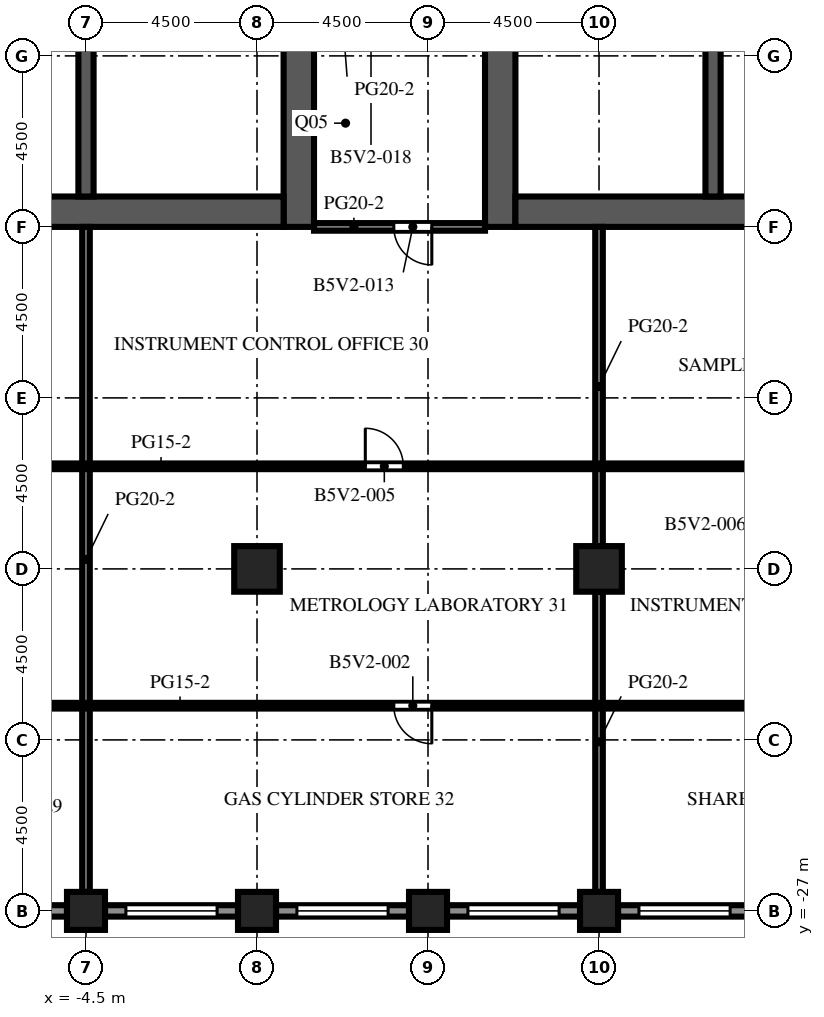
"""IFC4 building model, lengths in metres.
Left out: names, types, materials, properties, quantities, classifications, styles, units other than length and angle.
Written with IfcOpenShell. Run it as: python <this file> out.ifc"""

import sys

from ifc_helpers import new_model, si_unit, direction, frame, frame_2d, origin, origin_2d, place, context, subcontext, project, spatial, rectangle, extrude, element, fill, save


model = new_model("IFC4")
c1 = context("Model", 3, precision=1e-05, world=origin(), true_north=direction((0.0, 1.0)))
c2 = subcontext(c1, "Body", "Model", "MODEL_VIEW")
j1 = project(units=[si_unit("LENGTHUNIT", "METRE"), si_unit("PLANEANGLEUNIT", "RADIAN")], contexts=[c1])
p1 = place(None, origin())
s1 = spatial("IfcSite", under=j1, at=p1, CompositionType="ELEMENT")
p2 = place(p1, origin())
s2 = spatial("IfcBuilding", under=s1, at=p2, CompositionType="ELEMENT")
p3 = place(p2, frame((0.0, 0.0, 181.4)))
s3 = spatial("IfcBuildingStorey", under=s2, at=p3, CompositionType="ELEMENT", Elevation=181.4)
for number, where, z_axis, x_axis in (
    (1, (-4.5, -27.0, 0.0), (0.0, 0.0, 1.0), (1.0, 0.0, 0.0)),
    (2, (0.0, -27.0, 0.0), (0.0, 0.0, 1.0), (1.0, 0.0, 0.0)),
    (3, (4.5, -27.0, 0.0), (0.0, 0.0, 1.0), (1.0, 0.0, 0.0)),
    (4, (9.0, -27.0, 0.0), (0.0, 0.0, 1.0), (1.0, 0.0, 0.0)),
):
    element("IfcColumn", number, at=place(p3, frame(where, z_axis=z_axis, x_axis=x_axis)), inside=s3, PredefinedType="COLUMN", context=c2, shape_type="SweptSolid", body=[
        extrude(rectangle(XDim=1.0, YDim=1.0, at=origin_2d()), origin(), (0.0, 0.0, 1.0), 4.1),
    ])
for number, where, z_axis, x_axis in (
    (5, (0.0, -18.0, 0.0), (0.0, 0.0, 1.0), (1.0, 0.0, 0.0)),
    (6, (9.0, -18.0, 0.0), (0.0, 0.0, 1.0), (1.0, 0.0, 0.0)),
):
    element("IfcColumn", number, at=place(p3, frame(where, z_axis=z_axis, x_axis=x_axis)), inside=s3, PredefinedType="COLUMN", context=c2, shape_type="SweptSolid", body=[
        extrude(rectangle(XDim=1.2, YDim=1.2, at=origin_2d()), origin(), (0.0, 0.0, 1.0), 4.1),
    ])
p4 = place(p3, frame((1.1, -9.0, 0.0), z_axis=(0.0, 0.0, 1.0), x_axis=(0.0, 1.0, 0.0)))
e7 = element("IfcWall", 7, at=p4, inside=s3, PredefinedType="SHEAR", context=c2, shape_type="SweptSolid", body=[
    extrude(rectangle(XDim=27.5, YDim=0.8, at=frame_2d((13.75, 0.0))), origin(), (0.0, 0.0, 1.0), 4.1),
])
p5 = place(p4, frame((12.55, 0.0, 0.0)))
e8 = element("IfcOpeningElement", 8, at=p5, cuts=e7, PredefinedType="OPENING", context=c2, shape_type="SweptSolid", body=[
    extrude(rectangle(XDim=2.4, YDim=2.4, at=frame_2d((1.2, 1.2))), frame((0.0, 0.41, 0.0), z_axis=(0.0, -1.0, 0.0), x_axis=(1.0, 0.0, 0.0)), (0.0, 0.0, 1.0), 0.82),
])
p6 = place(p4, frame((3.85, 0.0, 0.0)))
e9 = element("IfcOpeningElement", 9, at=p6, cuts=e7, PredefinedType="OPENING", context=c2, shape_type="SweptSolid", body=[
    extrude(rectangle(XDim=0.95, YDim=2.1, at=frame_2d((0.475, 1.05))), frame((0.0, 0.41, 0.0), z_axis=(0.0, -1.0, 0.0), x_axis=(1.0, 0.0, 0.0)), (0.0, 0.0, 1.0), 0.82),
])
p7 = place(p4, frame((23.475, 0.0, 0.0)))
e10 = element("IfcOpeningElement", 10, at=p7, cuts=e7, PredefinedType="OPENING", context=c2, shape_type="SweptSolid", body=[
    extrude(rectangle(XDim=1.2, YDim=2.1, at=frame_2d((0.6, 1.05))), frame((0.0, 0.41, 0.0), z_axis=(0.0, -1.0, 0.0), x_axis=(1.0, 0.0, 0.0)), (0.0, 0.0, 1.0), 0.82),
])
p8 = place(p3, frame((-9.7, -8.6, 0.0), z_axis=(0.0, 0.0, 1.0), x_axis=(1.0, 0.0, 0.0)))
e11 = element("IfcWall", 11, at=p8, inside=s3, PredefinedType="SHEAR", context=c2, shape_type="SweptSolid", body=[
    extrude(rectangle(XDim=10.4, YDim=0.8, at=frame_2d((5.2, 0.0))), origin(), (0.0, 0.0, 1.0), 4.1),
])
p9 = place(p3, frame((-4.5, -8.2, 0.0), z_axis=(0.0, 0.0, 1.0), x_axis=(0.0, 1.0, 0.0)))
e12 = element("IfcWall", 12, at=p9, inside=s3, PredefinedType="SHEAR", context=c2, shape_type="SweptSolid", body=[
    extrude(rectangle(XDim=7.5, YDim=0.4, at=frame_2d((3.75, 0.0))), origin(), (0.0, 0.0, 1.0), 4.1),
])
p10 = place(p3, frame((6.4, -9.0, 0.0), z_axis=(0.0, 0.0, 1.0), x_axis=(0.0, 1.0, 0.0)))
e13 = element("IfcWall", 13, at=p10, inside=s3, PredefinedType="SHEAR", context=c2, shape_type="SweptSolid", body=[
    extrude(rectangle(XDim=27.5, YDim=0.8, at=frame_2d((13.75, 0.0))), origin(), (0.0, 0.0, 1.0), 4.1),
])
p11 = place(p10, frame((12.55, 0.0, 0.0)))
e14 = element("IfcOpeningElement", 14, at=p11, cuts=e13, PredefinedType="OPENING", context=c2, shape_type="SweptSolid", body=[
    extrude(rectangle(XDim=2.4, YDim=2.4, at=frame_2d((1.2, 1.2))), frame((0.0, 0.41, 0.0), z_axis=(0.0, -1.0, 0.0), x_axis=(1.0, 0.0, 0.0)), (0.0, 0.0, 1.0), 0.82),
])
p12 = place(p10, frame((3.85, 0.0, 0.0)))
e15 = element("IfcOpeningElement", 15, at=p12, cuts=e13, PredefinedType="OPENING", context=c2, shape_type="SweptSolid", body=[
    extrude(rectangle(XDim=0.95, YDim=2.1, at=frame_2d((0.475, 1.05))), frame((0.0, 0.41, 0.0), z_axis=(0.0, -1.0, 0.0), x_axis=(1.0, 0.0, 0.0)), (0.0, 0.0, 1.0), 0.82),
])
p13 = place(p10, frame((23.475, 0.0, 0.0)))
e16 = element("IfcOpeningElement", 16, at=p13, cuts=e13, PredefinedType="OPENING", context=c2, shape_type="SweptSolid", body=[
    extrude(rectangle(XDim=1.2, YDim=2.1, at=frame_2d((0.6, 1.05))), frame((0.0, 0.41, 0.0), z_axis=(0.0, -1.0, 0.0), x_axis=(1.0, 0.0, 0.0)), (0.0, 0.0, 1.0), 0.82),
])
p14 = place(p3, frame((6.8, -8.6, 0.0), z_axis=(0.0, 0.0, 1.0), x_axis=(1.0, 0.0, 0.0)))
e17 = element("IfcWall", 17, at=p14, inside=s3, PredefinedType="SHEAR", context=c2, shape_type="SweptSolid", body=[
    extrude(rectangle(XDim=10.4, YDim=0.8, at=frame_2d((5.2, 0.0))), origin(), (0.0, 0.0, 1.0), 4.1),
])
p15 = place(p3, frame((12.0, -8.2, 0.0), z_axis=(0.0, 0.0, 1.0), x_axis=(0.0, 1.0, 0.0)))
e18 = element("IfcWall", 18, at=p15, inside=s3, PredefinedType="SHEAR", context=c2, shape_type="SweptSolid", body=[
    extrude(rectangle(XDim=7.5, YDim=0.4, at=frame_2d((3.75, 0.0))), origin(), (0.0, 0.0, 1.0), 4.1),
])
p16 = place(p3, frame((-5.0, -27.0, 0.0), z_axis=(0.0, 0.0, 1.0), x_axis=(-1.0, 0.0, 0.0)))
e19 = element("IfcWall", 19, at=p16, inside=s3, PredefinedType="SOLIDWALL", context=c2, shape_type="SweptSolid", body=[
    extrude(rectangle(XDim=3.5, YDim=0.3, at=frame_2d((1.75, 0.0))), origin(), (0.0, 0.0, 1.0), 2.7),
])
p17 = place(p16, frame((0.55, 0.0, 0.8)))
e20 = element("IfcOpeningElement", 20, at=p17, cuts=e19, PredefinedType="OPENING", context=c2, shape_type="SweptSolid", body=[
    extrude(rectangle(XDim=2.4, YDim=1.7, at=frame_2d((1.2, 0.85))), frame((0.0, 0.16, 0.0), z_axis=(0.0, -1.0, 0.0), x_axis=(1.0, 0.0, 0.0)), (0.0, 0.0, 1.0), 0.32),
])
p18 = place(p3, frame((-0.5, -27.0, 0.0), z_axis=(0.0, 0.0, 1.0), x_axis=(-1.0, 0.0, 0.0)))
e21 = element("IfcWall", 21, at=p18, inside=s3, PredefinedType="SOLIDWALL", context=c2, shape_type="SweptSolid", body=[
    extrude(rectangle(XDim=3.5, YDim=0.3, at=frame_2d((1.75, 0.0))), origin(), (0.0, 0.0, 1.0), 2.7),
])
p19 = place(p18, frame((0.55, 0.0, 0.8)))
e22 = element("IfcOpeningElement", 22, at=p19, cuts=e21, PredefinedType="OPENING", context=c2, shape_type="SweptSolid", body=[
    extrude(rectangle(XDim=2.4, YDim=1.7, at=frame_2d((1.2, 0.85))), frame((0.0, 0.16, 0.0), z_axis=(0.0, -1.0, 0.0), x_axis=(1.0, 0.0, 0.0)), (0.0, 0.0, 1.0), 0.32),
])
p20 = place(p3, frame((4.0, -27.0, 0.0), z_axis=(0.0, 0.0, 1.0), x_axis=(-1.0, 0.0, 0.0)))
e23 = element("IfcWall", 23, at=p20, inside=s3, PredefinedType="SOLIDWALL", context=c2, shape_type="SweptSolid", body=[
    extrude(rectangle(XDim=3.5, YDim=0.3, at=frame_2d((1.75, 0.0))), origin(), (0.0, 0.0, 1.0), 2.7),
])
p21 = place(p20, frame((0.55, 0.0, 0.8)))
e24 = element("IfcOpeningElement", 24, at=p21, cuts=e23, PredefinedType="OPENING", context=c2, shape_type="SweptSolid", body=[
    extrude(rectangle(XDim=2.4, YDim=1.7, at=frame_2d((1.2, 0.85))), frame((0.0, 0.16, 0.0), z_axis=(0.0, -1.0, 0.0), x_axis=(1.0, 0.0, 0.0)), (0.0, 0.0, 1.0), 0.32),
])
p22 = place(p3, frame((8.5, -27.0, 0.0), z_axis=(0.0, 0.0, 1.0), x_axis=(-1.0, 0.0, 0.0)))
e25 = element("IfcWall", 25, at=p22, inside=s3, PredefinedType="SOLIDWALL", context=c2, shape_type="SweptSolid", body=[
    extrude(rectangle(XDim=3.5, YDim=0.3, at=frame_2d((1.75, 0.0))), origin(), (0.0, 0.0, 1.0), 2.7),
])
p23 = place(p22, frame((0.55, 0.0, 0.8)))
e26 = element("IfcOpeningElement", 26, at=p23, cuts=e25, PredefinedType="OPENING", context=c2, shape_type="SweptSolid", body=[
    extrude(rectangle(XDim=2.4, YDim=1.7, at=frame_2d((1.2, 0.85))), frame((0.0, 0.16, 0.0), z_axis=(0.0, -1.0, 0.0), x_axis=(1.0, 0.0, 0.0)), (0.0, 0.0, 1.0), 0.32),
])
p24 = place(p3, frame((13.0, -27.0, 0.0), z_axis=(0.0, 0.0, 1.0), x_axis=(-1.0, 0.0, 0.0)))
e27 = element("IfcWall", 27, at=p24, inside=s3, PredefinedType="SOLIDWALL", context=c2, shape_type="SweptSolid", body=[
    extrude(rectangle(XDim=3.5, YDim=0.3, at=frame_2d((1.75, 0.0))), origin(), (0.0, 0.0, 1.0), 2.7),
])
p25 = place(p24, frame((0.55, 0.0, 0.8)))
e28 = element("IfcOpeningElement", 28, at=p25, cuts=e27, PredefinedType="OPENING", context=c2, shape_type="SweptSolid", body=[
    extrude(rectangle(XDim=2.4, YDim=1.7, at=frame_2d((1.2, 0.85))), frame((0.0, 0.16, 0.0), z_axis=(0.0, -1.0, 0.0), x_axis=(1.0, 0.0, 0.0)), (0.0, 0.0, 1.0), 0.32),
])
p26 = place(p3, frame((-4.3, -5.35, 0.0), z_axis=(0.0, 0.0, 1.0), x_axis=(1.0, 0.0, 0.0)))
e29 = element("IfcWall", 29, at=p26, inside=s3, PredefinedType="PARTITIONING", context=c2, shape_type="SweptSolid", body=[
    extrude(rectangle(XDim=5.0, YDim=0.1, at=frame_2d((2.5, 0.0))), origin(), (0.0, 0.0, 1.0), 3.5),
])
p27 = place(p26, frame((2.0, 0.0, 0.0)))
e30 = element("IfcOpeningElement", 30, at=p27, cuts=e29, PredefinedType="OPENING", context=c2, shape_type="SweptSolid", body=[
    extrude(rectangle(XDim=1.0, YDim=2.1, at=frame_2d((0.5, 1.05))), frame((0.0, 0.06, 0.0), z_axis=(0.0, -1.0, 0.0), x_axis=(1.0, 0.0, 0.0)), (0.0, 0.0, 1.0), 0.12),
])
p28 = place(p3, frame((6.8, -5.35, 0.0), z_axis=(0.0, 0.0, 1.0), x_axis=(1.0, 0.0, 0.0)))
e31 = element("IfcWall", 31, at=p28, inside=s3, PredefinedType="PARTITIONING", context=c2, shape_type="SweptSolid", body=[
    extrude(rectangle(XDim=5.0, YDim=0.1, at=frame_2d((2.5, 0.0))), origin(), (0.0, 0.0, 1.0), 3.5),
])
p29 = place(p28, frame((2.0, 0.0, 0.0)))
e32 = element("IfcOpeningElement", 32, at=p29, cuts=e31, PredefinedType="OPENING", context=c2, shape_type="SweptSolid", body=[
    extrude(rectangle(XDim=1.0, YDim=2.1, at=frame_2d((0.5, 1.05))), frame((0.0, 0.06, 0.0), z_axis=(0.0, -1.0, 0.0), x_axis=(1.0, 0.0, 0.0)), (0.0, 0.0, 1.0), 0.12),
])
p30 = place(p3, frame((-4.5, -26.5, 0.0), z_axis=(0.0, 0.0, 1.0), x_axis=(0.0, 1.0, 0.0)))
e33 = element("IfcWall", 33, at=p30, inside=s3, PredefinedType="PARTITIONING", context=c2, shape_type="SweptSolid", body=[
    extrude(rectangle(XDim=17.5, YDim=0.2, at=frame_2d((8.75, 0.0))), origin(), (0.0, 0.0, 1.0), 3.5),
])
p31 = place(p3, frame((9.0, -26.5, 0.0), z_axis=(0.0, 0.0, 1.0), x_axis=(0.0, 1.0, 0.0)))
e34 = element("IfcWall", 34, at=p31, inside=s3, PredefinedType="PARTITIONING", context=c2, shape_type="SweptSolid", body=[
    extrude(rectangle(XDim=7.9, YDim=0.2, at=frame_2d((3.95, 0.0))), origin(), (0.0, 0.0, 1.0), 3.5),
])
p32 = place(p3, frame((9.0, -17.4, 0.0), z_axis=(0.0, 0.0, 1.0), x_axis=(0.0, 1.0, 0.0)))
e35 = element("IfcWall", 35, at=p32, inside=s3, PredefinedType="PARTITIONING", context=c2, shape_type="SweptSolid", body=[
    extrude(rectangle(XDim=8.4, YDim=0.2, at=frame_2d((4.2, 0.0))), origin(), (0.0, 0.0, 1.0), 3.5),
])
p33 = place(p3, frame((21.0, -21.6, 0.0), z_axis=(0.0, 0.0, 1.0), x_axis=(-1.0, 0.0, 0.0)))
e36 = element("IfcWall", 36, at=p33, inside=s3, PredefinedType="PARTITIONING", context=c2, shape_type="SweptSolid", body=[
    extrude(rectangle(XDim=34.5, YDim=0.15, at=frame_2d((17.25, 0.0))), origin(), (0.0, 0.0, 1.0), 3.5),
])
p34 = place(p33, frame((28.65, 0.0, 0.0)))
e37 = element("IfcOpeningElement", 37, at=p34, cuts=e36, PredefinedType="OPENING", context=c2, shape_type="SweptSolid", body=[
    extrude(rectangle(XDim=1.0, YDim=2.1, at=frame_2d((0.5, 1.05))), frame((0.0, 0.085, 0.0), z_axis=(0.0, -1.0, 0.0), x_axis=(1.0, 0.0, 0.0)), (0.0, 0.0, 1.0), 0.17),
])
p35 = place(p33, frame((16.4, 0.0, 0.0)))
e38 = element("IfcOpeningElement", 38, at=p35, cuts=e36, PredefinedType="OPENING", context=c2, shape_type="SweptSolid", body=[
    extrude(rectangle(XDim=1.0, YDim=2.1, at=frame_2d((0.5, 1.05))), frame((0.0, 0.085, 0.0), z_axis=(0.0, -1.0, 0.0), x_axis=(1.0, 0.0, 0.0)), (0.0, 0.0, 1.0), 0.17),
])
p36 = place(p33, frame((5.15, 0.0, 0.0)))
e39 = element("IfcOpeningElement", 39, at=p36, cuts=e36, PredefinedType="OPENING", context=c2, shape_type="SweptSolid", body=[
    extrude(rectangle(XDim=1.0, YDim=2.1, at=frame_2d((0.5, 1.05))), frame((0.0, 0.085, 0.0), z_axis=(0.0, -1.0, 0.0), x_axis=(1.0, 0.0, 0.0)), (0.0, 0.0, 1.0), 0.17),
])
p37 = place(p3, frame((21.0, -15.3, 0.0), z_axis=(0.0, 0.0, 1.0), x_axis=(-1.0, 0.0, 0.0)))
e40 = element("IfcWall", 40, at=p37, inside=s3, PredefinedType="PARTITIONING", context=c2, shape_type="SweptSolid", body=[
    extrude(rectangle(XDim=34.5, YDim=0.15, at=frame_2d((17.25, 0.0))), origin(), (0.0, 0.0, 1.0), 3.5),
])
p38 = place(p37, frame((28.9, 0.0, 0.0)))
e41 = element("IfcOpeningElement", 41, at=p38, cuts=e40, PredefinedType="OPENING", context=c2, shape_type="SweptSolid", body=[
    extrude(rectangle(XDim=1.0, YDim=2.1, at=frame_2d((0.5, 1.05))), frame((0.0, 0.085, 0.0), z_axis=(0.0, -1.0, 0.0), x_axis=(1.0, 0.0, 0.0)), (0.0, 0.0, 1.0), 0.17),
])
p39 = place(p37, frame((17.15, 0.0, 0.0)))
e42 = element("IfcOpeningElement", 42, at=p39, cuts=e40, PredefinedType="OPENING", context=c2, shape_type="SweptSolid", body=[
    extrude(rectangle(XDim=1.0, YDim=2.1, at=frame_2d((0.5, 1.05))), frame((0.0, 0.085, 0.0), z_axis=(0.0, -1.0, 0.0), x_axis=(1.0, 0.0, 0.0)), (0.0, 0.0, 1.0), 0.17),
])
p40 = place(p37, frame((7.15, 0.0, 0.0)))
e43 = element("IfcOpeningElement", 43, at=p40, cuts=e40, PredefinedType="OPENING", context=c2, shape_type="SweptSolid", body=[
    extrude(rectangle(XDim=1.0, YDim=2.1, at=frame_2d((0.5, 1.05))), frame((0.0, 0.085, 0.0), z_axis=(0.0, -1.0, 0.0), x_axis=(1.0, 0.0, 0.0)), (0.0, 0.0, 1.0), 0.17),
])
p41 = place(p3, frame((6.0, -9.0, 0.0), z_axis=(0.0, 0.0, 1.0), x_axis=(-1.0, 0.0, 0.0)))
e44 = element("IfcWall", 44, at=p41, inside=s3, PredefinedType="PARTITIONING", context=c2, shape_type="SweptSolid", body=[
    extrude(rectangle(XDim=4.5, YDim=0.2, at=frame_2d((2.25, 0.0))), origin(), (0.0, 0.0, 1.0), 3.5),
])
p42 = place(p41, frame((1.4, 0.0, 0.0)))
e45 = element("IfcOpeningElement", 45, at=p42, cuts=e44, PredefinedType="OPENING", context=c2, shape_type="SweptSolid", body=[
    extrude(rectangle(XDim=1.0, YDim=2.1, at=frame_2d((0.5, 1.05))), frame((0.0, 0.11, 0.0), z_axis=(0.0, -1.0, 0.0), x_axis=(1.0, 0.0, 0.0)), (0.0, 0.0, 1.0), 0.22),
])
p43 = place(p19, origin())
e46 = element("IfcWindow", 46, at=p43, inside=s3, PartitioningType="SINGLE_PANEL", PredefinedType="WINDOW", context=c2, shape_type="SweptSolid", body=[
    extrude(rectangle(XDim=2.4, YDim=1.7, at=frame_2d((1.2, 0.85))), frame((0.0, 0.03, 0.0), z_axis=(0.0, -1.0, 0.0), x_axis=(1.0, 0.0, 0.0)), (0.0, 0.0, 1.0), 0.06),
])
fill(e22, e46)
p44 = place(p21, origin())
e47 = element("IfcWindow", 47, at=p44, inside=s3, PartitioningType="SINGLE_PANEL", PredefinedType="WINDOW", context=c2, shape_type="SweptSolid", body=[
    extrude(rectangle(XDim=2.4, YDim=1.7, at=frame_2d((1.2, 0.85))), frame((0.0, 0.03, 0.0), z_axis=(0.0, -1.0, 0.0), x_axis=(1.0, 0.0, 0.0)), (0.0, 0.0, 1.0), 0.06),
])
fill(e24, e47)
p45 = place(p23, origin())
e48 = element("IfcWindow", 48, at=p45, inside=s3, PartitioningType="SINGLE_PANEL", PredefinedType="WINDOW", context=c2, shape_type="SweptSolid", body=[
    extrude(rectangle(XDim=2.4, YDim=1.7, at=frame_2d((1.2, 0.85))), frame((0.0, 0.03, 0.0), z_axis=(0.0, -1.0, 0.0), x_axis=(1.0, 0.0, 0.0)), (0.0, 0.0, 1.0), 0.06),
])
fill(e26, e48)
p46 = place(p25, origin())
e49 = element("IfcWindow", 49, at=p46, inside=s3, PartitioningType="SINGLE_PANEL", PredefinedType="WINDOW", context=c2, shape_type="SweptSolid", body=[
    extrude(rectangle(XDim=2.4, YDim=1.7, at=frame_2d((1.2, 0.85))), frame((0.0, 0.03, 0.0), z_axis=(0.0, -1.0, 0.0), x_axis=(1.0, 0.0, 0.0)), (0.0, 0.0, 1.0), 0.06),
])
fill(e28, e49)
p47 = place(p6, origin())
e50 = element("IfcDoor", 50, at=p47, inside=s3, OperationType="SINGLE_SWING_LEFT", PredefinedType="DOOR", context=c2, shape_type="SweptSolid", body=[
    extrude(rectangle(XDim=0.95, YDim=2.1, at=frame_2d((0.475, 1.05))), frame((0.0, 0.375, 0.0), z_axis=(0.0, -1.0, 0.0), x_axis=(1.0, 0.0, 0.0)), (0.0, 0.0, 1.0), 0.05),
])
fill(e9, e50)
p48 = place(p27, origin())
e51 = element("IfcDoor", 51, at=p48, inside=s3, OperationType="SINGLE_SWING_RIGHT", PredefinedType="DOOR", context=c2, shape_type="SweptSolid", body=[
    extrude(rectangle(XDim=1.0, YDim=2.1, at=frame_2d((0.5, 1.05))), frame((0.0, 0.025, 0.0), z_axis=(0.0, -1.0, 0.0), x_axis=(1.0, 0.0, 0.0)), (0.0, 0.0, 1.0), 0.05),
])
fill(e30, e51)
p49 = place(p12, origin())
e52 = element("IfcDoor", 52, at=p49, inside=s3, OperationType="SINGLE_SWING_RIGHT", PredefinedType="DOOR", context=c2, shape_type="SweptSolid", body=[
    extrude(rectangle(XDim=0.95, YDim=2.1, at=frame_2d((0.475, 1.05))), frame((0.0, -0.325, 0.0), z_axis=(0.0, -1.0, 0.0), x_axis=(1.0, 0.0, 0.0)), (0.0, 0.0, 1.0), 0.05),
])
fill(e15, e52)
p50 = place(p29, origin())
e53 = element("IfcDoor", 53, at=p50, inside=s3, OperationType="SINGLE_SWING_LEFT", PredefinedType="DOOR", context=c2, shape_type="SweptSolid", body=[
    extrude(rectangle(XDim=1.0, YDim=2.1, at=frame_2d((0.5, 1.05))), frame((0.0, 0.025, 0.0), z_axis=(0.0, -1.0, 0.0), x_axis=(1.0, 0.0, 0.0)), (0.0, 0.0, 1.0), 0.05),
])
fill(e32, e53)
p51 = place(p35, origin())
e54 = element("IfcDoor", 54, at=p51, inside=s3, OperationType="SINGLE_SWING_LEFT", PredefinedType="DOOR", context=c2, shape_type="SweptSolid", body=[
    extrude(rectangle(XDim=1.0, YDim=2.1, at=frame_2d((0.5, 1.05))), frame((0.0, 0.025, 0.0), z_axis=(0.0, -1.0, 0.0), x_axis=(1.0, 0.0, 0.0)), (0.0, 0.0, 1.0), 0.05),
])
fill(e38, e54)
p52 = place(p39, origin())
e55 = element("IfcDoor", 55, at=p52, inside=s3, OperationType="SINGLE_SWING_RIGHT", PredefinedType="DOOR", context=c2, shape_type="SweptSolid", body=[
    extrude(rectangle(XDim=1.0, YDim=2.1, at=frame_2d((0.5, 1.05))), frame((0.0, 0.025, 0.0), z_axis=(0.0, -1.0, 0.0), x_axis=(1.0, 0.0, 0.0)), (0.0, 0.0, 1.0), 0.05),
])
fill(e42, e55)
p53 = place(p42, origin())
e56 = element("IfcDoor", 56, at=p53, inside=s3, OperationType="SINGLE_SWING_LEFT", PredefinedType="DOOR", context=c2, shape_type="SweptSolid", body=[
    extrude(rectangle(XDim=1.0, YDim=2.1, at=frame_2d((0.5, 1.05))), frame((0.0, 0.025, 0.0), z_axis=(0.0, -1.0, 0.0), x_axis=(1.0, 0.0, 0.0)), (0.0, 0.0, 1.0), 0.05),
])
fill(e45, e56)
save(model, sys.argv[1])
